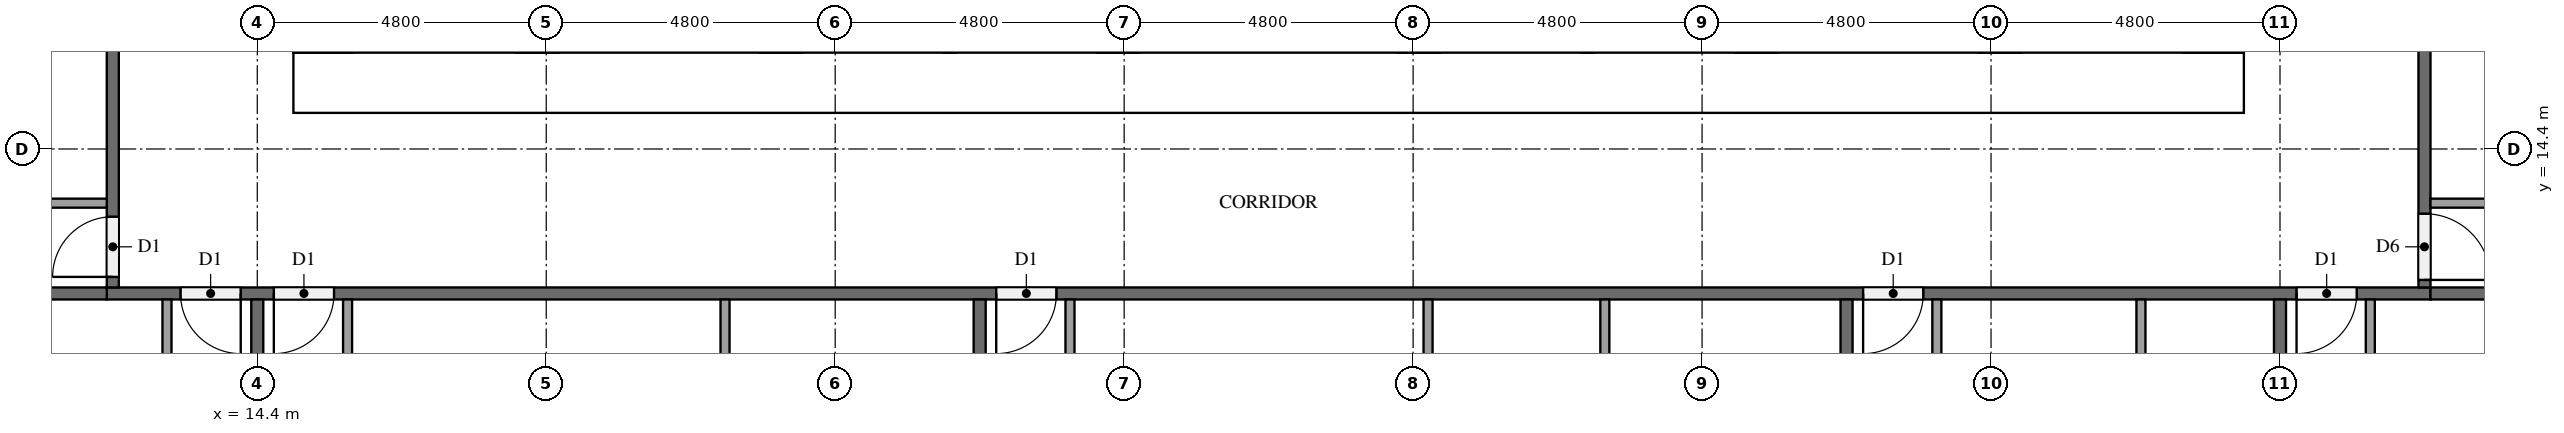
"""IFC4 building model, lengths in metres.
Left out: names, types, materials, properties, quantities, classifications, styles, units other than length and angle.
Written with IfcOpenShell. Run it as: python <this file> out.ifc"""

import sys

from ifc_helpers import new_model, si_unit, direction, frame, frame_2d, origin, place, context, subcontext, project, spatial, rectangle, extrude, element, fill, save


model = new_model("IFC4")
c1 = context("Model", 3, precision=1e-05, world=origin(), true_north=direction((0.0, 1.0)))
c2 = subcontext(c1, "Body", "Model", "MODEL_VIEW")
j1 = project(units=[si_unit("LENGTHUNIT", "METRE"), si_unit("PLANEANGLEUNIT", "RADIAN")], contexts=[c1])
p1 = place(None, origin())
s1 = spatial("IfcSite", under=j1, at=p1, CompositionType="ELEMENT")
p2 = place(p1, origin())
s2 = spatial("IfcBuilding", under=s1, at=p2, CompositionType="ELEMENT")
p3 = place(p2, frame((0.0, 0.0, 29.4)))
s3 = spatial("IfcBuildingStorey", under=s2, at=p3, CompositionType="ELEMENT", Elevation=29.4)
p4 = place(p3, frame((15.0, 15.5, 0.0), z_axis=(0.0, 0.0, 1.0), x_axis=(1.0, 0.0, 0.0)))
e1 = element("IfcWall", 1, at=p4, inside=s3, PredefinedType="SHEAR", context=c2, shape_type="SweptSolid", body=[
    extrude(rectangle(XDim=32.4, YDim=1.0, at=frame_2d((16.2, 0.0))), origin(), (0.0, 0.0, 1.0), 3.2),
])
p5 = place(p4, frame((15.3, 0.0, 0.0)))
e2 = element("IfcOpeningElement", 2, at=p5, cuts=e1, PredefinedType="OPENING", context=c2, shape_type="SweptSolid", body=[
    extrude(rectangle(XDim=1.8, YDim=2.1, at=frame_2d((0.9, 1.05))), frame((0.0, 0.51, 0.0), z_axis=(0.0, -1.0, 0.0), x_axis=(1.0, 0.0, 0.0)), (0.0, 0.0, 1.0), 1.02),
])
p6 = place(p3, frame((15.5, 16.0, 0.0), z_axis=(0.0, 0.0, 1.0), x_axis=(0.0, 1.0, 0.0)))
e3 = element("IfcWall", 3, at=p6, inside=s3, PredefinedType="SHEAR", context=c2, shape_type="SweptSolid", body=[
    extrude(rectangle(XDim=20.8, YDim=1.0, at=frame_2d((10.4, 0.0))), origin(), (0.0, 0.0, 1.0), 3.2),
])
p7 = place(p6, frame((4.76, 0.0, 0.0)))
e4 = element("IfcOpeningElement", 4, at=p7, cuts=e3, PredefinedType="OPENING", context=c2, shape_type="SweptSolid", body=[
    extrude(rectangle(XDim=1.2, YDim=2.1, at=frame_2d((0.6, 1.05))), frame((0.0, 0.51, 0.0), z_axis=(0.0, -1.0, 0.0), x_axis=(1.0, 0.0, 0.0)), (0.0, 0.0, 1.0), 1.02),
])
p8 = place(p3, frame((46.9, 16.0, 0.0), z_axis=(0.0, 0.0, 1.0), x_axis=(0.0, 1.0, 0.0)))
e5 = element("IfcWall", 5, at=p8, inside=s3, PredefinedType="SHEAR", context=c2, shape_type="SweptSolid", body=[
    extrude(rectangle(XDim=20.8, YDim=1.0, at=frame_2d((10.4, 0.0))), origin(), (0.0, 0.0, 1.0), 3.2),
])
p9 = place(p8, frame((10.1, 0.0, 0.0)))
e6 = element("IfcOpeningElement", 6, at=p9, cuts=e5, PredefinedType="OPENING", context=c2, shape_type="SweptSolid", body=[
    extrude(rectangle(XDim=1.2, YDim=2.1, at=frame_2d((0.6, 1.05))), frame((0.0, 0.51, 0.0), z_axis=(0.0, -1.0, 0.0), x_axis=(1.0, 0.0, 0.0)), (0.0, 0.0, 1.0), 1.02),
])
p10 = place(p3, frame((23.1, 16.0, 0.0), z_axis=(0.0, 0.0, 1.0), x_axis=(0.0, 1.0, 0.0)))
e7 = element("IfcWall", 7, at=p10, inside=s3, PredefinedType="SHEAR", context=c2, shape_type="SweptSolid", body=[
    extrude(rectangle(XDim=20.8, YDim=0.7, at=frame_2d((10.4, 0.0))), origin(), (0.0, 0.0, 1.0), 3.2),
])
p11 = place(p3, frame((50.5, 12.0, 0.0), z_axis=(0.0, 0.0, 1.0), x_axis=(-1.0, 0.0, 0.0)))
e8 = element("IfcWall", 8, at=p11, inside=s3, PredefinedType="PARTITIONING", context=c2, shape_type="SweptSolid", body=[
    extrude(rectangle(XDim=38.6, YDim=0.2, at=frame_2d((19.3, 0.0))), origin(), (0.0, 0.0, 1.0), 3.2),
])
p12 = place(p11, frame((36.375, 0.0, 0.0)))
e9 = element("IfcOpeningElement", 9, at=p12, cuts=e8, PredefinedType="OPENING", context=c2, shape_type="SweptSolid", body=[
    extrude(rectangle(XDim=1.0, YDim=2.1, at=frame_2d((0.5, 1.05))), frame((0.0, 0.11, 0.0), z_axis=(0.0, -1.0, 0.0), x_axis=(1.0, 0.0, 0.0)), (0.0, 0.0, 1.0), 0.22),
])
p13 = place(p11, frame((34.825, 0.0, 0.0)))
e10 = element("IfcOpeningElement", 10, at=p13, cuts=e8, PredefinedType="OPENING", context=c2, shape_type="SweptSolid", body=[
    extrude(rectangle(XDim=1.0, YDim=2.1, at=frame_2d((0.5, 1.05))), frame((0.0, 0.11, 0.0), z_axis=(0.0, -1.0, 0.0), x_axis=(1.0, 0.0, 0.0)), (0.0, 0.0, 1.0), 0.22),
])
p14 = place(p11, frame((22.825, 0.0, 0.0)))
e11 = element("IfcOpeningElement", 11, at=p14, cuts=e8, PredefinedType="OPENING", context=c2, shape_type="SweptSolid", body=[
    extrude(rectangle(XDim=1.0, YDim=2.1, at=frame_2d((0.5, 1.05))), frame((0.0, 0.11, 0.0), z_axis=(0.0, -1.0, 0.0), x_axis=(1.0, 0.0, 0.0)), (0.0, 0.0, 1.0), 0.22),
])
p15 = place(p11, frame((8.425, 0.0, 0.0)))
e12 = element("IfcOpeningElement", 12, at=p15, cuts=e8, PredefinedType="OPENING", context=c2, shape_type="SweptSolid", body=[
    extrude(rectangle(XDim=1.0, YDim=2.1, at=frame_2d((0.5, 1.05))), frame((0.0, 0.11, 0.0), z_axis=(0.0, -1.0, 0.0), x_axis=(1.0, 0.0, 0.0)), (0.0, 0.0, 1.0), 0.22),
])
p16 = place(p11, frame((1.225, 0.0, 0.0)))
e13 = element("IfcOpeningElement", 13, at=p16, cuts=e8, PredefinedType="OPENING", context=c2, shape_type="SweptSolid", body=[
    extrude(rectangle(XDim=1.0, YDim=2.1, at=frame_2d((0.5, 1.05))), frame((0.0, 0.11, 0.0), z_axis=(0.0, -1.0, 0.0), x_axis=(1.0, 0.0, 0.0)), (0.0, 0.0, 1.0), 0.22),
])
p17 = place(p3, frame((50.4, 40.7, 0.0), z_axis=(0.0, 0.0, 1.0), x_axis=(0.0, -1.0, 0.0)))
e14 = element("IfcWall", 14, at=p17, inside=s3, PredefinedType="PARTITIONING", context=c2, shape_type="SweptSolid", body=[
    extrude(rectangle(XDim=28.6, YDim=0.2, at=frame_2d((14.3, 0.0))), origin(), (0.0, 0.0, 1.0), 3.2),
])
p18 = place(p17, frame((27.375, 0.0, 0.0)))
e15 = element("IfcOpeningElement", 15, at=p18, cuts=e14, PredefinedType="OPENING", context=c2, shape_type="SweptSolid", body=[
    extrude(rectangle(XDim=1.1, YDim=2.1, at=frame_2d((0.55, 1.05))), frame((0.0, 0.11, 0.0), z_axis=(0.0, -1.0, 0.0), x_axis=(1.0, 0.0, 0.0)), (0.0, 0.0, 1.0), 0.22),
])
p19 = place(p17, frame((8.225, 0.0, 0.0)))
e16 = element("IfcOpeningElement", 16, at=p19, cuts=e14, PredefinedType="OPENING", context=c2, shape_type="SweptSolid", body=[
    extrude(rectangle(XDim=1.0, YDim=2.1, at=frame_2d((0.5, 1.05))), frame((0.0, 0.11, 0.0), z_axis=(0.0, -1.0, 0.0), x_axis=(1.0, 0.0, 0.0)), (0.0, 0.0, 1.0), 0.22),
])
p20 = place(p3, frame((12.0, 12.1, 0.0), z_axis=(0.0, 0.0, 1.0), x_axis=(0.0, 1.0, 0.0)))
e17 = element("IfcWall", 17, at=p20, inside=s3, PredefinedType="PARTITIONING", context=c2, shape_type="SweptSolid", body=[
    extrude(rectangle(XDim=28.6, YDim=0.2, at=frame_2d((14.3, 0.0))), origin(), (0.0, 0.0, 1.0), 3.2),
])
p21 = place(p20, frame((16.975, 0.0, 0.0)))
e18 = element("IfcOpeningElement", 18, at=p21, cuts=e17, PredefinedType="OPENING", context=c2, shape_type="SweptSolid", body=[
    extrude(rectangle(XDim=1.0, YDim=2.1, at=frame_2d((0.5, 1.05))), frame((0.0, 0.11, 0.0), z_axis=(0.0, -1.0, 0.0), x_axis=(1.0, 0.0, 0.0)), (0.0, 0.0, 1.0), 0.22),
])
p22 = place(p20, frame((0.175, 0.0, 0.0)))
e19 = element("IfcOpeningElement", 19, at=p22, cuts=e17, PredefinedType="OPENING", context=c2, shape_type="SweptSolid", body=[
    extrude(rectangle(XDim=1.0, YDim=2.1, at=frame_2d((0.5, 1.05))), frame((0.0, 0.11, 0.0), z_axis=(0.0, -1.0, 0.0), x_axis=(1.0, 0.0, 0.0)), (0.0, 0.0, 1.0), 0.22),
])
p23 = place(p3, frame((14.4, 11.9, 0.0), z_axis=(0.0, 0.0, 1.0), x_axis=(0.0, -1.0, 0.0)))
e20 = element("IfcWall", 20, at=p23, inside=s3, PredefinedType="PARTITIONING", context=c2, shape_type="SweptSolid", body=[
    extrude(rectangle(XDim=11.45, YDim=0.2, at=frame_2d((5.725, 0.0))), origin(), (0.0, 0.0, 1.0), 3.2),
])
for number, where, z_axis, x_axis in (
    (21, (0.1, 12.0, 0.0), (0.0, 0.0, 1.0), (1.0, 0.0, 0.0)),
    (22, (26.4, 11.9, 0.0), (0.0, 0.0, 1.0), (0.0, -1.0, 0.0)),
    (23, (40.8, 11.9, 0.0), (0.0, 0.0, 1.0), (0.0, -1.0, 0.0)),
    (24, (48.0, 11.9, 0.0), (0.0, 0.0, 1.0), (0.0, -1.0, 0.0)),
):
    element("IfcWall", number, at=place(p3, frame(where, z_axis=z_axis, x_axis=x_axis)), inside=s3, PredefinedType="PARTITIONING", context=c2, shape_type="SweptSolid", body=[
        extrude(rectangle(XDim=11.8, YDim=0.2, at=frame_2d((5.9, 0.0))), origin(), (0.0, 0.0, 1.0), 3.2),
    ])
p24 = place(p3, frame((50.5, 12.0, 0.0), z_axis=(0.0, 0.0, 1.0), x_axis=(1.0, 0.0, 0.0)))
e25 = element("IfcWall", 25, at=p24, inside=s3, PredefinedType="PARTITIONING", context=c2, shape_type="SweptSolid", body=[
    extrude(rectangle(XDim=7.0, YDim=0.2, at=frame_2d((3.5, 0.0))), origin(), (0.0, 0.0, 1.0), 3.2),
])
p25 = place(p3, frame((12.9, 11.9, 0.0), z_axis=(0.0, 0.0, 1.0), x_axis=(0.0, -1.0, 0.0)))
e26 = element("IfcWall", 26, at=p25, inside=s3, PredefinedType="PARTITIONING", context=c2, shape_type="SweptSolid", body=[
    extrude(rectangle(XDim=3.125, YDim=0.15, at=frame_2d((1.562, 0.0))), origin(), (0.0, 0.0, 1.0), 3.2),
])
p26 = place(p3, frame((22.17, 11.9, 0.0), z_axis=(0.0, 0.0, 1.0), x_axis=(0.0, -1.0, 0.0)))
e27 = element("IfcWall", 27, at=p26, inside=s3, PredefinedType="PARTITIONING", context=c2, shape_type="SweptSolid", body=[
    extrude(rectangle(XDim=3.725, YDim=0.15, at=frame_2d((1.862, 0.0))), origin(), (0.0, 0.0, 1.0), 3.2),
])
p27 = place(p3, frame((15.9, 11.9, 0.0), z_axis=(0.0, 0.0, 1.0), x_axis=(0.0, -1.0, 0.0)))
e28 = element("IfcWall", 28, at=p27, inside=s3, PredefinedType="PARTITIONING", context=c2, shape_type="SweptSolid", body=[
    extrude(rectangle(XDim=3.875, YDim=0.15, at=frame_2d((1.938, 0.0))), origin(), (0.0, 0.0, 1.0), 3.2),
])
for number, where, z_axis, x_axis in (
    (29, (33.848, 11.9, 0.0), (0.0, 0.0, 1.0), (0.0, -1.0, 0.0)),
    (30, (36.785, 11.9, 0.0), (0.0, 0.0, 1.0), (0.0, -1.0, 0.0)),
):
    element("IfcWall", number, at=place(p3, frame(where, z_axis=z_axis, x_axis=x_axis)), inside=s3, PredefinedType="PARTITIONING", context=c2, shape_type="SweptSolid", body=[
        extrude(rectangle(XDim=3.575, YDim=0.15, at=frame_2d((1.788, 0.0))), origin(), (0.0, 0.0, 1.0), 3.2),
    ])
p28 = place(p3, frame((27.9, 11.9, 0.0), z_axis=(0.0, 0.0, 1.0), x_axis=(0.0, -1.0, 0.0)))
e31 = element("IfcWall", 31, at=p28, inside=s3, PredefinedType="PARTITIONING", context=c2, shape_type="SweptSolid", body=[
    extrude(rectangle(XDim=3.725, YDim=0.15, at=frame_2d((1.862, 0.0))), origin(), (0.0, 0.0, 1.0), 3.2),
])
p29 = place(p3, frame((45.69, 11.9, 0.0), z_axis=(0.0, 0.0, 1.0), x_axis=(0.0, -1.0, 0.0)))
e32 = element("IfcWall", 32, at=p29, inside=s3, PredefinedType="PARTITIONING", context=c2, shape_type="SweptSolid", body=[
    extrude(rectangle(XDim=4.325, YDim=0.15, at=frame_2d((2.163, 0.0))), origin(), (0.0, 0.0, 1.0), 3.2),
])
p30 = place(p3, frame((42.3, 11.9, 0.0), z_axis=(0.0, 0.0, 1.0), x_axis=(0.0, -1.0, 0.0)))
e33 = element("IfcWall", 33, at=p30, inside=s3, PredefinedType="PARTITIONING", context=c2, shape_type="SweptSolid", body=[
    extrude(rectangle(XDim=4.475, YDim=0.15, at=frame_2d((2.237, 0.0))), origin(), (0.0, 0.0, 1.0), 3.2),
])
p31 = place(p3, frame((49.5, 11.9, 0.0), z_axis=(0.0, 0.0, 1.0), x_axis=(0.0, -1.0, 0.0)))
e34 = element("IfcWall", 34, at=p31, inside=s3, PredefinedType="PARTITIONING", context=c2, shape_type="SweptSolid", body=[
    extrude(rectangle(XDim=3.425, YDim=0.15, at=frame_2d((1.712, 0.0))), origin(), (0.0, 0.0, 1.0), 3.2),
])
p32 = place(p3, frame((50.5, 13.5, 0.0), z_axis=(0.0, 0.0, 1.0), x_axis=(1.0, 0.0, 0.0)))
e35 = element("IfcWall", 35, at=p32, inside=s3, PredefinedType="PARTITIONING", context=c2, shape_type="SweptSolid", body=[
    extrude(rectangle(XDim=1.925, YDim=0.15, at=frame_2d((0.962, 0.0))), origin(), (0.0, 0.0, 1.0), 3.2),
])
p33 = place(p3, frame((11.9, 13.5, 0.0), z_axis=(0.0, 0.0, 1.0), x_axis=(-1.0, 0.0, 0.0)))
e36 = element("IfcWall", 36, at=p33, inside=s3, PredefinedType="PARTITIONING", context=c2, shape_type="SweptSolid", body=[
    extrude(rectangle(XDim=4.625, YDim=0.15, at=frame_2d((2.312, 0.0))), origin(), (0.0, 0.0, 1.0), 3.2),
])
p34 = place(p5, frame((1.8, 0.0, 0.0), z_axis=(0.0, 0.0, 1.0), x_axis=(-1.0, 0.0, 0.0)))
e37 = element("IfcDoor", 37, at=p34, inside=s3, OperationType="DOUBLE_DOOR_SINGLE_SWING", PredefinedType="DOOR", context=c2, shape_type="SweptSolid", body=[
    extrude(rectangle(XDim=1.8, YDim=2.1, at=frame_2d((0.9, 1.05))), frame((0.0, 0.025, 0.0), z_axis=(0.0, -1.0, 0.0), x_axis=(1.0, 0.0, 0.0)), (0.0, 0.0, 1.0), 0.05),
])
fill(e2, e37)
p35 = place(p12, origin())
e38 = element("IfcDoor", 38, at=p35, inside=s3, OperationType="SINGLE_SWING_LEFT", PredefinedType="DOOR", context=c2, shape_type="SweptSolid", body=[
    extrude(rectangle(XDim=1.0, YDim=2.1, at=frame_2d((0.5, 1.05))), frame((0.0, 0.025, 0.0), z_axis=(0.0, -1.0, 0.0), x_axis=(1.0, 0.0, 0.0)), (0.0, 0.0, 1.0), 0.05),
])
fill(e9, e38)
p36 = place(p13, origin())
e39 = element("IfcDoor", 39, at=p36, inside=s3, OperationType="SINGLE_SWING_RIGHT", PredefinedType="DOOR", context=c2, shape_type="SweptSolid", body=[
    extrude(rectangle(XDim=1.0, YDim=2.1, at=frame_2d((0.5, 1.05))), frame((0.0, 0.025, 0.0), z_axis=(0.0, -1.0, 0.0), x_axis=(1.0, 0.0, 0.0)), (0.0, 0.0, 1.0), 0.05),
])
fill(e10, e39)
p37 = place(p14, origin())
e40 = element("IfcDoor", 40, at=p37, inside=s3, OperationType="SINGLE_SWING_RIGHT", PredefinedType="DOOR", context=c2, shape_type="SweptSolid", body=[
    extrude(rectangle(XDim=1.0, YDim=2.1, at=frame_2d((0.5, 1.05))), frame((0.0, 0.025, 0.0), z_axis=(0.0, -1.0, 0.0), x_axis=(1.0, 0.0, 0.0)), (0.0, 0.0, 1.0), 0.05),
])
fill(e11, e40)
p38 = place(p15, origin())
e41 = element("IfcDoor", 41, at=p38, inside=s3, OperationType="SINGLE_SWING_RIGHT", PredefinedType="DOOR", context=c2, shape_type="SweptSolid", body=[
    extrude(rectangle(XDim=1.0, YDim=2.1, at=frame_2d((0.5, 1.05))), frame((0.0, 0.025, 0.0), z_axis=(0.0, -1.0, 0.0), x_axis=(1.0, 0.0, 0.0)), (0.0, 0.0, 1.0), 0.05),
])
fill(e12, e41)
p39 = place(p16, origin())
e42 = element("IfcDoor", 42, at=p39, inside=s3, OperationType="SINGLE_SWING_RIGHT", PredefinedType="DOOR", context=c2, shape_type="SweptSolid", body=[
    extrude(rectangle(XDim=1.0, YDim=2.1, at=frame_2d((0.5, 1.05))), frame((0.0, 0.025, 0.0), z_axis=(0.0, -1.0, 0.0), x_axis=(1.0, 0.0, 0.0)), (0.0, 0.0, 1.0), 0.05),
])
fill(e13, e42)
p40 = place(p18, origin())
e43 = element("IfcDoor", 43, at=p40, inside=s3, OperationType="SINGLE_SWING_RIGHT", PredefinedType="DOOR", context=c2, shape_type="SweptSolid", body=[
    extrude(rectangle(XDim=1.1, YDim=2.1, at=frame_2d((0.55, 1.05))), frame((0.0, 0.025, 0.0), z_axis=(0.0, -1.0, 0.0), x_axis=(1.0, 0.0, 0.0)), (0.0, 0.0, 1.0), 0.05),
])
fill(e15, e43)
p41 = place(p22, origin())
e44 = element("IfcDoor", 44, at=p41, inside=s3, OperationType="SINGLE_SWING_LEFT", PredefinedType="DOOR", context=c2, shape_type="SweptSolid", body=[
    extrude(rectangle(XDim=1.0, YDim=2.1, at=frame_2d((0.5, 1.05))), frame((0.0, 0.025, 0.0), z_axis=(0.0, -1.0, 0.0), x_axis=(1.0, 0.0, 0.0)), (0.0, 0.0, 1.0), 0.05),
])
fill(e19, e44)
save(model, sys.argv[1])
